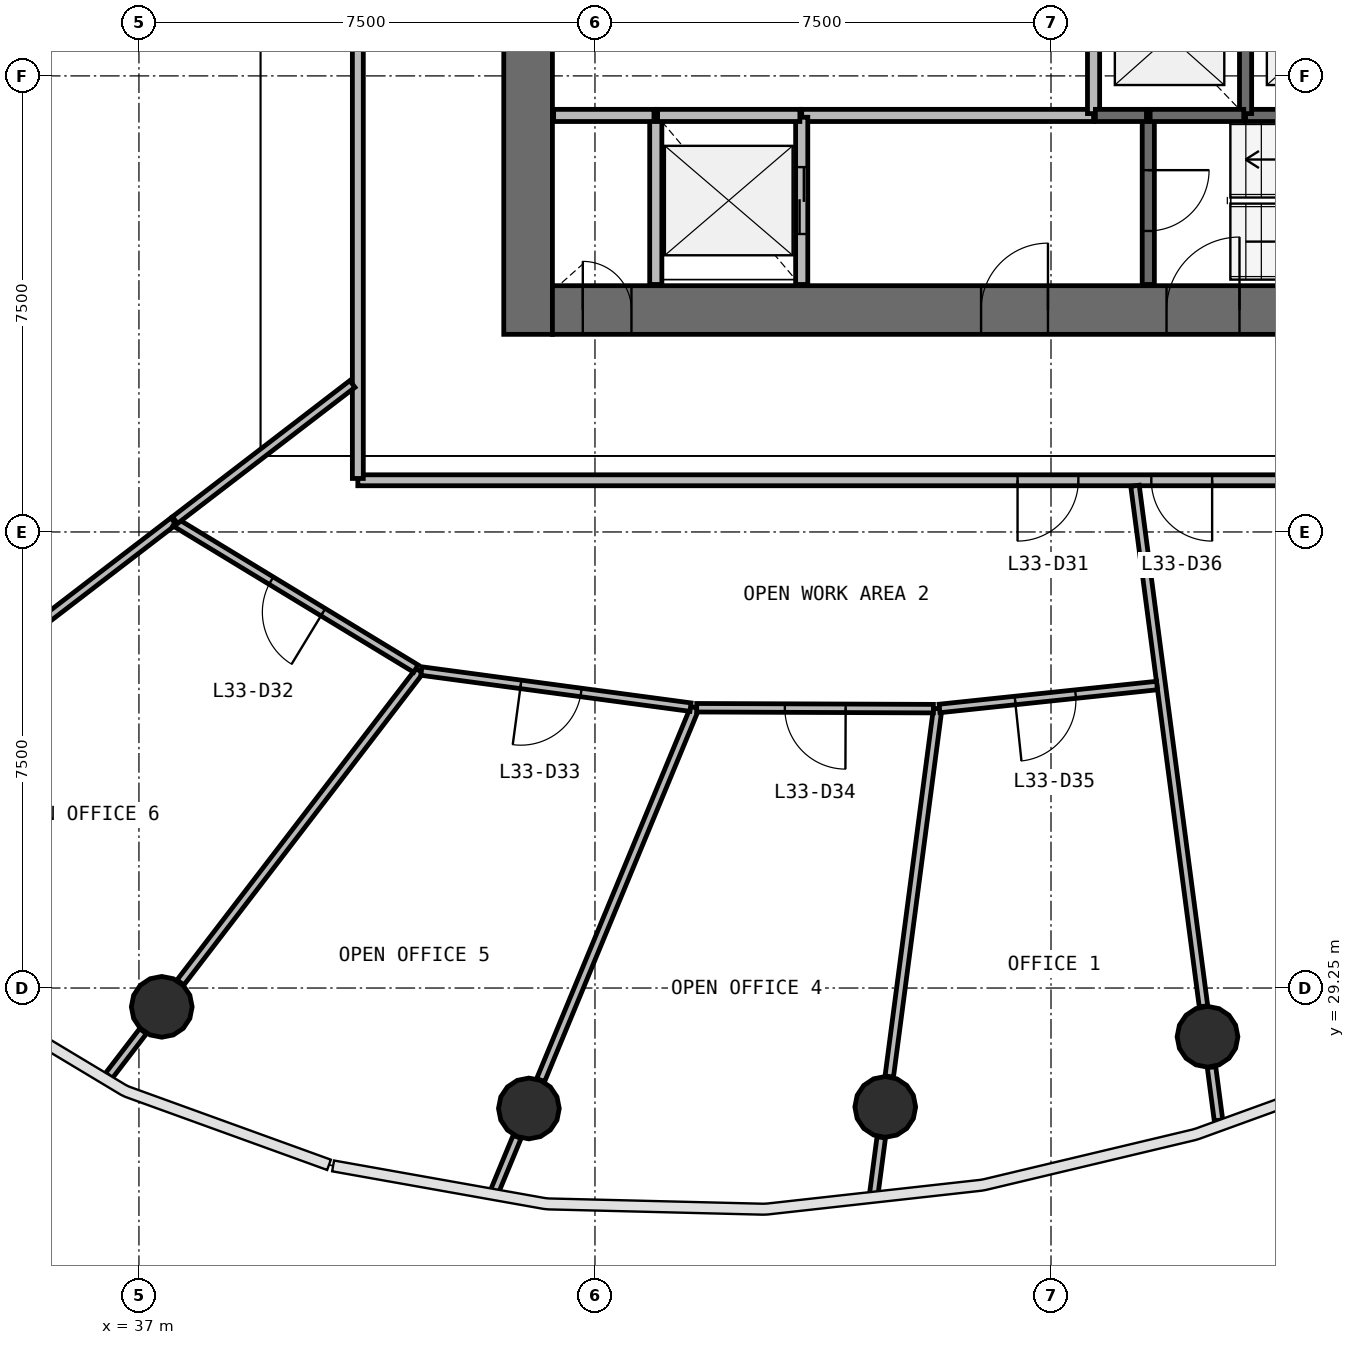
"""IFC4 building model, lengths in metres.
Left out: names, types, materials, properties, quantities, classifications, styles, units other than length and angle.
Written with IfcOpenShell. Run it as: python <this file> out.ifc"""

import sys

from ifc_helpers import new_model, si_unit, direction, frame, frame_2d, origin, origin_2d, place, context, subcontext, project, spatial, rectangle, circle, extrude, source, transform, mapped, element, fill, save


model = new_model("IFC4")
c1 = context("Model", 3, precision=1e-05, world=origin(), true_north=direction((0.0, 1.0)))
c2 = subcontext(c1, "Body", "Model", "MODEL_VIEW")
j1 = project(units=[si_unit("LENGTHUNIT", "METRE"), si_unit("PLANEANGLEUNIT", "RADIAN")], contexts=[c1])
p1 = place(None, origin())
s1 = spatial("IfcSite", under=j1, at=p1, CompositionType="ELEMENT")
p2 = place(p1, origin())
s2 = spatial("IfcBuilding", under=s1, at=p2, CompositionType="ELEMENT")
p3 = place(p2, frame((0.0, 0.0, 140.9)))
s3 = spatial("IfcBuildingStorey", under=s2, at=p3, CompositionType="ELEMENT", Elevation=140.9)
p4 = place(p3, frame((43.4, 56.0, 0.0), z_axis=(0.0, 0.0, 1.0), x_axis=(0.0, -1.0, 0.0)))
e1 = element("IfcWall", 1, at=p4, inside=s3, PredefinedType="SHEAR", context=c2, shape_type="SweptSolid", body=[
    extrude(rectangle(XDim=16.0, YDim=0.8, at=frame_2d((8.0, 0.0))), origin(), (0.0, 0.0, 1.0), 3.9),
])
p5 = place(p4, frame((7.1, 0.0, 0.0)))
e2 = element("IfcOpeningElement", 2, at=p5, cuts=e1, PredefinedType="OPENING", context=c2, shape_type="SweptSolid", body=[
    extrude(rectangle(XDim=1.8, YDim=2.1, at=frame_2d((0.9, 1.05))), frame((0.0, 0.41, 0.0), z_axis=(0.0, -1.0, 0.0), x_axis=(1.0, 0.0, 0.0)), (0.0, 0.0, 1.0), 0.82),
])
p6 = place(p3, frame((43.8, 40.4, 0.0), z_axis=(0.0, 0.0, 1.0), x_axis=(1.0, 0.0, 0.0)))
e3 = element("IfcWall", 3, at=p6, inside=s3, PredefinedType="SHEAR", context=c2, shape_type="SweptSolid", body=[
    extrude(rectangle(XDim=16.4, YDim=0.8, at=frame_2d((8.2, 0.0))), origin(), (0.0, 0.0, 1.0), 3.9),
])
p7 = place(p6, frame((10.1, 0.0, 0.0)))
e4 = element("IfcOpeningElement", 4, at=p7, cuts=e3, PredefinedType="OPENING", context=c2, shape_type="SweptSolid", body=[
    extrude(rectangle(XDim=1.2, YDim=2.1, at=frame_2d((0.6, 1.05))), frame((0.0, 0.41, 0.0), z_axis=(0.0, -1.0, 0.0), x_axis=(1.0, 0.0, 0.0)), (0.0, 0.0, 1.0), 0.82),
])
p8 = place(p6, frame((7.05, 0.0, 0.0)))
e5 = element("IfcOpeningElement", 5, at=p8, cuts=e3, PredefinedType="OPENING", context=c2, shape_type="SweptSolid", body=[
    extrude(rectangle(XDim=1.1, YDim=2.1, at=frame_2d((0.55, 1.05))), frame((0.0, 0.41, 0.0), z_axis=(0.0, -1.0, 0.0), x_axis=(1.0, 0.0, 0.0)), (0.0, 0.0, 1.0), 0.82),
])
p9 = place(p6, frame((0.5, 0.0, 0.0)))
e6 = element("IfcOpeningElement", 6, at=p9, cuts=e3, PredefinedType="OPENING", context=c2, shape_type="SweptSolid", body=[
    extrude(rectangle(XDim=0.8, YDim=2.1, at=frame_2d((0.4, 1.05))), frame((0.0, 0.41, 0.0), z_axis=(0.0, -1.0, 0.0), x_axis=(1.0, 0.0, 0.0)), (0.0, 0.0, 1.0), 0.82),
])
m1 = source(origin(), c2, "Body", "SweptSolid", [
    extrude(circle(Radius=0.5, at=origin_2d()), origin(), (0.0, 0.0, 1.0), 3.9),
])
for number, where, z_axis, x_axis in (
    (7, (37.375, 28.94, 0.0), (0.0, 0.0, 1.0), (1.0, 0.0, 0.0)),
    (8, (43.413, 27.269, 0.0), (0.0, 0.0, 1.0), (1.0, 0.0, 0.0)),
    (9, (49.274, 27.295, 0.0), (0.0, 0.0, 1.0), (1.0, 0.0, 0.0)),
    (10, (54.574, 28.449, 0.0), (0.0, 0.0, 1.0), (1.0, 0.0, 0.0)),
):
    element("IfcColumn", number, at=place(p3, frame(where, z_axis=z_axis, x_axis=x_axis)), inside=s3, PredefinedType="COLUMN", context=c2, shape_type="MappedRepresentation", body=[
        mapped(m1, transform((0.0, 0.0, 0.0), scale=1.0)),
    ])
p10 = place(p3, frame((52.7, 43.6, 0.0), z_axis=(0.0, 0.0, 1.0), x_axis=(-1.0, 0.0, 0.0)))
e11 = element("IfcWall", 11, at=p10, inside=s3, PredefinedType="SOLIDWALL", context=c2, shape_type="SweptSolid", body=[
    extrude(rectangle(XDim=4.8, YDim=0.2, at=frame_2d((2.4, 0.0))), origin(), (0.0, 0.0, 1.0), 3.58),
])
p11 = place(p3, frame((45.5, 43.6, 0.0), z_axis=(0.0, 0.0, 1.0), x_axis=(0.0, -1.0, 0.0)))
e12 = element("IfcWall", 12, at=p11, inside=s3, PredefinedType="SOLIDWALL", context=c2, shape_type="SweptSolid", body=[
    extrude(rectangle(XDim=2.78, YDim=0.2, at=frame_2d((1.39, 0.0))), origin(), (0.0, 0.0, 1.0), 3.58),
])
p12 = place(p3, frame((47.9, 40.82, 0.0), z_axis=(0.0, 0.0, 1.0), x_axis=(0.0, 1.0, 0.0)))
e13 = element("IfcWall", 13, at=p12, inside=s3, PredefinedType="SOLIDWALL", context=c2, shape_type="SweptSolid", body=[
    extrude(rectangle(XDim=2.75, YDim=0.2, at=frame_2d((1.375, 0.0))), origin(), (0.0, 0.0, 1.0), 3.58),
])
p13 = place(p12, frame((0.83, 0.0, 0.0)))
e14 = element("IfcOpeningElement", 14, at=p13, cuts=e13, PredefinedType="OPENING", context=c2, shape_type="SweptSolid", body=[
    extrude(rectangle(XDim=1.1, YDim=2.1, at=frame_2d((0.55, 1.05))), frame((0.0, 0.11, 0.0), z_axis=(0.0, -1.0, 0.0), x_axis=(1.0, 0.0, 0.0)), (0.0, 0.0, 1.0), 0.22),
])
p14 = place(p3, frame((53.6, 43.6, 0.0), z_axis=(0.0, 0.0, 1.0), x_axis=(0.0, -1.0, 0.0)))
e15 = element("IfcWall", 15, at=p14, inside=s3, PredefinedType="SOLIDWALL", context=c2, shape_type="SweptSolid", body=[
    extrude(rectangle(XDim=2.78, YDim=0.2, at=frame_2d((1.39, 0.0))), origin(), (0.0, 0.0, 1.0), 3.58),
])
p15 = place(p14, frame((0.9, 0.0, 0.0)))
e16 = element("IfcOpeningElement", 16, at=p15, cuts=e15, PredefinedType="OPENING", context=c2, shape_type="SweptSolid", body=[
    extrude(rectangle(XDim=1.0, YDim=2.1, at=frame_2d((0.5, 1.05))), frame((0.0, 0.11, 0.0), z_axis=(0.0, -1.0, 0.0), x_axis=(1.0, 0.0, 0.0)), (0.0, 0.0, 1.0), 0.22),
])
p16 = place(p3, frame((55.2, 43.6, 0.0), z_axis=(0.0, 0.0, 1.0), x_axis=(1.0, 0.0, 0.0)))
e17 = element("IfcWall", 17, at=p16, inside=s3, PredefinedType="SOLIDWALL", context=c2, shape_type="SweptSolid", body=[
    extrude(rectangle(XDim=2.5, YDim=0.2, at=frame_2d((1.25, 0.0))), origin(), (0.0, 0.0, 1.0), 3.58),
])
p17 = place(p3, frame((47.87, 43.6, 0.0), z_axis=(0.0, 0.0, 1.0), x_axis=(-1.0, 0.0, 0.0)))
e18 = element("IfcWall", 18, at=p17, inside=s3, PredefinedType="SOLIDWALL", context=c2, shape_type="SweptSolid", body=[
    extrude(rectangle(XDim=2.34, YDim=0.2, at=frame_2d((1.17, 0.0))), origin(), (0.0, 0.0, 1.0), 3.58),
])
for number, where, z_axis, x_axis in (
    (19, (52.7, 45.99, 0.0), (0.0, 0.0, 1.0), (0.0, -1.0, 0.0)),
    (20, (55.2, 43.63, 0.0), (0.0, 0.0, 1.0), (0.0, 1.0, 0.0)),
):
    element("IfcWall", number, at=place(p3, frame(where, z_axis=z_axis, x_axis=x_axis)), inside=s3, PredefinedType="SOLIDWALL", context=c2, shape_type="SweptSolid", body=[
        extrude(rectangle(XDim=2.36, YDim=0.2, at=frame_2d((1.18, 0.0))), origin(), (0.0, 0.0, 1.0), 3.58),
    ])
p18 = place(p3, frame((45.47, 43.6, 0.0), z_axis=(0.0, 0.0, 1.0), x_axis=(-1.0, 0.0, 0.0)))
e21 = element("IfcWall", 21, at=p18, inside=s3, PredefinedType="SOLIDWALL", context=c2, shape_type="SweptSolid", body=[
    extrude(rectangle(XDim=1.65, YDim=0.2, at=frame_2d((0.825, 0.0))), origin(), (0.0, 0.0, 1.0), 3.58),
])
p19 = place(p3, frame((53.63, 43.6, 0.0), z_axis=(0.0, 0.0, 1.0), x_axis=(1.0, 0.0, 0.0)))
e22 = element("IfcWall", 22, at=p19, inside=s3, PredefinedType="SOLIDWALL", context=c2, shape_type="SweptSolid", body=[
    extrude(rectangle(XDim=1.54, YDim=0.2, at=frame_2d((0.77, 0.0))), origin(), (0.0, 0.0, 1.0), 3.58),
])
p20 = place(p3, frame((52.73, 43.6, 0.0), z_axis=(0.0, 0.0, 1.0), x_axis=(1.0, 0.0, 0.0)))
e23 = element("IfcWall", 23, at=p20, inside=s3, PredefinedType="SOLIDWALL", context=c2, shape_type="SweptSolid", body=[
    extrude(rectangle(XDim=0.84, YDim=0.2, at=frame_2d((0.42, 0.0))), origin(), (0.0, 0.0, 1.0), 3.58),
])
p21 = place(p3, frame((63.4, 37.6, 0.0), z_axis=(0.0, 0.0, 1.0), x_axis=(-1.0, 0.0, 0.0)))
e24 = element("IfcWall", 24, at=p21, inside=s3, PredefinedType="PARTITIONING", context=c2, shape_type="SweptSolid", body=[
    extrude(rectangle(XDim=22.8, YDim=0.18, at=frame_2d((11.4, 0.0))), origin(), (0.0, 0.0, 1.0), 2.88),
])
p22 = place(p21, frame((10.95, 0.0, 0.0)))
e25 = element("IfcOpeningElement", 25, at=p22, cuts=e24, PredefinedType="OPENING", context=c2, shape_type="SweptSolid", body=[
    extrude(rectangle(XDim=1.0, YDim=2.1, at=frame_2d((0.5, 1.05))), frame((0.0, 0.1, 0.0), z_axis=(0.0, -1.0, 0.0), x_axis=(1.0, 0.0, 0.0)), (0.0, 0.0, 1.0), 0.2),
])
p23 = place(p21, frame((8.75, 0.0, 0.0)))
e26 = element("IfcOpeningElement", 26, at=p23, cuts=e24, PredefinedType="OPENING", context=c2, shape_type="SweptSolid", body=[
    extrude(rectangle(XDim=1.0, YDim=2.1, at=frame_2d((0.5, 1.05))), frame((0.0, 0.1, 0.0), z_axis=(0.0, -1.0, 0.0), x_axis=(1.0, 0.0, 0.0)), (0.0, 0.0, 1.0), 0.2),
])
p24 = place(p3, frame((40.6, 37.63, 0.0), z_axis=(0.0, 0.0, 1.0), x_axis=(0.0, 1.0, 0.0)))
e27 = element("IfcWall", 27, at=p24, inside=s3, PredefinedType="PARTITIONING", context=c2, shape_type="SweptSolid", body=[
    extrude(rectangle(XDim=20.74, YDim=0.18, at=frame_2d((10.37, 0.0))), origin(), (0.0, 0.0, 1.0), 2.88),
])
p25 = place(p24, frame((9.89, 0.0, 0.0)))
e28 = element("IfcOpeningElement", 28, at=p25, cuts=e27, PredefinedType="OPENING", context=c2, shape_type="SweptSolid", body=[
    extrude(rectangle(XDim=1.0, YDim=2.1, at=frame_2d((0.5, 1.05))), frame((0.0, 0.1, 0.0), z_axis=(0.0, -1.0, 0.0), x_axis=(1.0, 0.0, 0.0)), (0.0, 0.0, 1.0), 0.2),
])
p26 = place(p24, frame((7.69, 0.0, 0.0)))
e29 = element("IfcOpeningElement", 29, at=p26, cuts=e27, PredefinedType="OPENING", context=c2, shape_type="SweptSolid", body=[
    extrude(rectangle(XDim=1.0, YDim=2.1, at=frame_2d((0.5, 1.05))), frame((0.0, 0.1, 0.0), z_axis=(0.0, -1.0, 0.0), x_axis=(1.0, 0.0, 0.0)), (0.0, 0.0, 1.0), 0.2),
])
p27 = place(p3, frame((54.508, 28.949, 0.0), z_axis=(0.0, 0.0, 1.0), x_axis=(-0.130507901859, 0.991447269174, 0.0)))
e30 = element("IfcWall", 30, at=p27, inside=s3, PredefinedType="PARTITIONING", context=c2, shape_type="SweptSolid", body=[
    extrude(rectangle(XDim=8.635, YDim=0.14, at=frame_2d((4.318, 0.0))), origin(), (0.0, 0.0, 1.0), 2.88),
])
p28 = place(p3, frame((46.143, 33.86, 0.0), z_axis=(0.0, 0.0, 1.0), x_axis=(-0.382679251199, -0.923881264396, 0.0)))
e31 = element("IfcWall", 31, at=p28, inside=s3, PredefinedType="PARTITIONING", context=c2, shape_type="SweptSolid", body=[
    extrude(rectangle(XDim=6.629, YDim=0.14, at=frame_2d((3.314, 0.0))), origin(), (0.0, 0.0, 1.0), 2.88),
])
p29 = place(p3, frame((41.615, 34.467, 0.0), z_axis=(0.0, 0.0, 1.0), x_axis=(-0.608784495995, -0.793335639837, 0.0)))
e32 = element("IfcWall", 32, at=p29, inside=s3, PredefinedType="PARTITIONING", context=c2, shape_type="SweptSolid", body=[
    extrude(rectangle(XDim=6.461, YDim=0.14, at=frame_2d((3.23, 0.0))), origin(), (0.0, 0.0, 1.0), 2.88),
])
p30 = place(p3, frame((37.568, 36.926, 0.0), z_axis=(0.0, 0.0, 1.0), x_axis=(-0.793361598143, -0.608750667015, 0.0)))
e33 = element("IfcWall", 33, at=p30, inside=s3, PredefinedType="PARTITIONING", context=c2, shape_type="SweptSolid", body=[
    extrude(rectangle(XDim=6.295, YDim=0.14, at=frame_2d((3.147, 0.0))), origin(), (0.0, 0.0, 1.0), 2.88),
])
p31 = place(p3, frame((50.136, 33.844, 0.0), z_axis=(0.0, 0.0, 1.0), x_axis=(-0.13056215718, -0.991440125833, 0.0)))
e34 = element("IfcWall", 34, at=p31, inside=s3, PredefinedType="PARTITIONING", context=c2, shape_type="SweptSolid", body=[
    extrude(rectangle(XDim=6.102, YDim=0.14, at=frame_2d((3.051, 0.0))), origin(), (0.0, 0.0, 1.0), 2.88),
])
p32 = place(p3, frame((41.555, 34.503, 0.0), z_axis=(0.0, 0.0, 1.0), x_axis=(-0.854565482162, 0.519343659534, 0.0)))
e35 = element("IfcWall", 35, at=p32, inside=s3, PredefinedType="PARTITIONING", context=c2, shape_type="SweptSolid", body=[
    extrude(rectangle(XDim=4.635, YDim=0.14, at=frame_2d((2.318, 0.0))), origin(), (0.0, 0.0, 1.0), 2.88),
])
p33 = place(p32, frame((1.785, 0.0, 0.0)))
e36 = element("IfcOpeningElement", 36, at=p33, cuts=e35, PredefinedType="OPENING", context=c2, shape_type="SweptSolid", body=[
    extrude(rectangle(XDim=1.0, YDim=2.1, at=frame_2d((0.5, 1.05))), frame((0.0, 0.08, 0.0), z_axis=(0.0, -1.0, 0.0), x_axis=(1.0, 0.0, 0.0)), (0.0, 0.0, 1.0), 0.16),
])
p34 = place(p3, frame((46.071, 33.869, 0.0), z_axis=(0.0, 0.0, 1.0), x_axis=(-0.991127820381, 0.132912165233, 0.0)))
e37 = element("IfcWall", 37, at=p34, inside=s3, PredefinedType="PARTITIONING", context=c2, shape_type="SweptSolid", body=[
    extrude(rectangle(XDim=4.465, YDim=0.14, at=frame_2d((2.233, 0.0))), origin(), (0.0, 0.0, 1.0), 2.88),
])
p35 = place(p34, frame((1.815, 0.0, 0.0)))
e38 = element("IfcOpeningElement", 38, at=p35, cuts=e37, PredefinedType="OPENING", context=c2, shape_type="SweptSolid", body=[
    extrude(rectangle(XDim=1.0, YDim=2.1, at=frame_2d((0.5, 1.05))), frame((0.0, 0.08, 0.0), z_axis=(0.0, -1.0, 0.0), x_axis=(1.0, 0.0, 0.0)), (0.0, 0.0, 1.0), 0.16),
])
p36 = place(p3, frame((50.066, 33.844, 0.0), z_axis=(0.0, 0.0, 1.0), x_axis=(-0.999992683197, 0.003825382772, 0.0)))
e39 = element("IfcWall", 39, at=p36, inside=s3, PredefinedType="PARTITIONING", context=c2, shape_type="SweptSolid", body=[
    extrude(rectangle(XDim=3.893, YDim=0.14, at=frame_2d((1.947, 0.0))), origin(), (0.0, 0.0, 1.0), 2.88),
])
p37 = place(p36, frame((1.443, 0.0, 0.0)))
e40 = element("IfcOpeningElement", 40, at=p37, cuts=e39, PredefinedType="OPENING", context=c2, shape_type="SweptSolid", body=[
    extrude(rectangle(XDim=1.0, YDim=2.1, at=frame_2d((0.5, 1.05))), frame((0.0, 0.08, 0.0), z_axis=(0.0, -1.0, 0.0), x_axis=(1.0, 0.0, 0.0)), (0.0, 0.0, 1.0), 0.16),
])
p38 = place(p3, frame((40.51, 39.183, 0.0), z_axis=(0.0, 0.0, 1.0), x_axis=(-0.793363754773, -0.608747856352, 0.0)))
e41 = element("IfcWall", 41, at=p38, inside=s3, PredefinedType="PARTITIONING", context=c2, shape_type="SweptSolid", body=[
    extrude(rectangle(XDim=3.678, YDim=0.14, at=frame_2d((1.839, 0.0))), origin(), (0.0, 0.0, 1.0), 2.88),
])
p39 = place(p3, frame((53.743, 34.224, 0.0), z_axis=(0.0, 0.0, 1.0), x_axis=(-0.994492054084, -0.104811995325, 0.0)))
e42 = element("IfcWall", 42, at=p39, inside=s3, PredefinedType="PARTITIONING", context=c2, shape_type="SweptSolid", body=[
    extrude(rectangle(XDim=3.596, YDim=0.14, at=frame_2d((1.798, 0.0))), origin(), (0.0, 0.0, 1.0), 2.88),
])
p40 = place(p39, frame((1.347, 0.0, 0.0)))
e43 = element("IfcOpeningElement", 43, at=p40, cuts=e42, PredefinedType="OPENING", context=c2, shape_type="SweptSolid", body=[
    extrude(rectangle(XDim=1.0, YDim=2.1, at=frame_2d((0.5, 1.05))), frame((0.0, 0.08, 0.0), z_axis=(0.0, -1.0, 0.0), x_axis=(1.0, 0.0, 0.0)), (0.0, 0.0, 1.0), 0.16),
])
p41 = place(p3, frame((43.22, 26.802, 0.0), z_axis=(0.0, 0.0, 1.0), x_axis=(-0.382619989809, -0.923905808726, 0.0)))
e44 = element("IfcWall", 44, at=p41, inside=s3, PredefinedType="PARTITIONING", context=c2, shape_type="SweptSolid", body=[
    extrude(rectangle(XDim=0.965, YDim=0.14, at=frame_2d((0.482, 0.0))), origin(), (0.0, 0.0, 1.0), 2.88),
])
p42 = place(p3, frame((49.208, 26.795, 0.0), z_axis=(0.0, 0.0, 1.0), x_axis=(-0.130461235204, -0.991453410962, 0.0)))
e45 = element("IfcWall", 45, at=p42, inside=s3, PredefinedType="PARTITIONING", context=c2, shape_type="SweptSolid", body=[
    extrude(rectangle(XDim=0.939, YDim=0.14, at=frame_2d((0.47, 0.0))), origin(), (0.0, 0.0, 1.0), 2.88),
])
p43 = place(p3, frame((37.068, 28.54, 0.0), z_axis=(0.0, 0.0, 1.0), x_axis=(-0.608853638779, -0.793282576731, 0.0)))
e46 = element("IfcWall", 46, at=p43, inside=s3, PredefinedType="PARTITIONING", context=c2, shape_type="SweptSolid", body=[
    extrude(rectangle(XDim=0.923, YDim=0.14, at=frame_2d((0.461, 0.0))), origin(), (0.0, 0.0, 1.0), 2.88),
])
p44 = place(p3, frame((54.64, 27.948, 0.0), z_axis=(0.0, 0.0, 1.0), x_axis=(0.130404378549, -0.991460890835, 0.0)))
e47 = element("IfcWall", 47, at=p44, inside=s3, PredefinedType="PARTITIONING", context=c2, shape_type="SweptSolid", body=[
    extrude(rectangle(XDim=0.882, YDim=0.14, at=frame_2d((0.441, 0.0))), origin(), (0.0, 0.0, 1.0), 2.88),
])
m2 = source(origin(), c2, "Body", "SweptSolid", [
    extrude(rectangle(XDim=1.1, YDim=2.1, at=frame_2d((0.55, 1.05))), frame((0.0, 0.025, 0.0), z_axis=(0.0, -1.0, 0.0), x_axis=(1.0, 0.0, 0.0)), (0.0, 0.0, 1.0), 0.05),
])
p45 = place(p13, origin())
e48 = element("IfcDoor", 48, at=p45, inside=s3, OperationType="DOUBLE_DOOR_SLIDING", PredefinedType="USERDEFINED", context=c2, shape_type="MappedRepresentation", body=[
    mapped(m2, transform((0.0, 0.0, 0.0), scale=1.0)),
])
fill(e14, e48)
m3 = source(origin(), c2, "Body", "SweptSolid", [
    extrude(rectangle(XDim=1.2, YDim=2.1, at=frame_2d((0.6, 1.05))), frame((0.0, 0.025, 0.0), z_axis=(0.0, -1.0, 0.0), x_axis=(1.0, 0.0, 0.0)), (0.0, 0.0, 1.0), 0.05),
])
p46 = place(p7, origin())
e49 = element("IfcDoor", 49, at=p46, inside=s3, OperationType="SINGLE_SWING_RIGHT", PredefinedType="DOOR", context=c2, shape_type="MappedRepresentation", body=[
    mapped(m3, transform((0.0, 0.0, 0.0), scale=1.0)),
])
fill(e4, e49)
m4 = source(origin(), c2, "Body", "SweptSolid", [
    extrude(rectangle(XDim=1.0, YDim=2.1, at=frame_2d((0.5, 1.05))), frame((0.0, 0.025, 0.0), z_axis=(0.0, -1.0, 0.0), x_axis=(1.0, 0.0, 0.0)), (0.0, 0.0, 1.0), 0.05),
])
p47 = place(p15, origin())
e50 = element("IfcDoor", 50, at=p47, inside=s3, OperationType="SINGLE_SWING_LEFT", PredefinedType="DOOR", context=c2, shape_type="MappedRepresentation", body=[
    mapped(m4, transform((0.0, 0.0, 0.0), scale=1.0)),
])
fill(e16, e50)
m5 = source(origin(), c2, "Body", "SweptSolid", [
    extrude(rectangle(XDim=1.1, YDim=2.1, at=frame_2d((0.55, 1.05))), frame((0.0, 0.025, 0.0), z_axis=(0.0, -1.0, 0.0), x_axis=(1.0, 0.0, 0.0)), (0.0, 0.0, 1.0), 0.05),
])
p48 = place(p8, origin())
e51 = element("IfcDoor", 51, at=p48, inside=s3, OperationType="SINGLE_SWING_RIGHT", PredefinedType="DOOR", context=c2, shape_type="MappedRepresentation", body=[
    mapped(m5, transform((0.0, 0.0, 0.0), scale=1.0)),
])
fill(e5, e51)
m6 = source(origin(), c2, "Body", "SweptSolid", [
    extrude(rectangle(XDim=0.8, YDim=2.1, at=frame_2d((0.4, 1.05))), frame((0.0, 0.025, 0.0), z_axis=(0.0, -1.0, 0.0), x_axis=(1.0, 0.0, 0.0)), (0.0, 0.0, 1.0), 0.05),
])
p49 = place(p9, origin())
e52 = element("IfcDoor", 52, at=p49, inside=s3, OperationType="SINGLE_SWING_LEFT", PredefinedType="DOOR", context=c2, shape_type="MappedRepresentation", body=[
    mapped(m6, transform((0.0, 0.0, 0.0), scale=1.0)),
])
fill(e6, e52)
m7 = source(origin(), c2, "Body", "SweptSolid", [
    extrude(rectangle(XDim=1.0, YDim=2.1, at=frame_2d((0.5, 1.05))), frame((0.0, 0.025, 0.0), z_axis=(0.0, -1.0, 0.0), x_axis=(1.0, 0.0, 0.0)), (0.0, 0.0, 1.0), 0.05),
])
p50 = place(p22, origin())
e53 = element("IfcDoor", 53, at=p50, inside=s3, OperationType="SINGLE_SWING_RIGHT", PredefinedType="DOOR", context=c2, shape_type="MappedRepresentation", body=[
    mapped(m7, transform((0.0, 0.0, 0.0), scale=1.0)),
])
fill(e25, e53)
p51 = place(p33, origin())
e54 = element("IfcDoor", 54, at=p51, inside=s3, OperationType="SINGLE_SWING_LEFT", PredefinedType="DOOR", context=c2, shape_type="MappedRepresentation", body=[
    mapped(m7, transform((0.0, 0.0, 0.0), scale=1.0)),
])
fill(e36, e54)
p52 = place(p35, origin())
e55 = element("IfcDoor", 55, at=p52, inside=s3, OperationType="SINGLE_SWING_RIGHT", PredefinedType="DOOR", context=c2, shape_type="MappedRepresentation", body=[
    mapped(m7, transform((0.0, 0.0, 0.0), scale=1.0)),
])
fill(e38, e55)
p53 = place(p37, origin())
e56 = element("IfcDoor", 56, at=p53, inside=s3, OperationType="SINGLE_SWING_LEFT", PredefinedType="DOOR", context=c2, shape_type="MappedRepresentation", body=[
    mapped(m7, transform((0.0, 0.0, 0.0), scale=1.0)),
])
fill(e40, e56)
p54 = place(p40, origin())
e57 = element("IfcDoor", 57, at=p54, inside=s3, OperationType="SINGLE_SWING_RIGHT", PredefinedType="DOOR", context=c2, shape_type="MappedRepresentation", body=[
    mapped(m7, transform((0.0, 0.0, 0.0), scale=1.0)),
])
fill(e43, e57)
p55 = place(p23, origin())
e58 = element("IfcDoor", 58, at=p55, inside=s3, OperationType="SINGLE_SWING_LEFT", PredefinedType="DOOR", context=c2, shape_type="MappedRepresentation", body=[
    mapped(m7, transform((0.0, 0.0, 0.0), scale=1.0)),
])
fill(e26, e58)
save(model, sys.argv[1])
